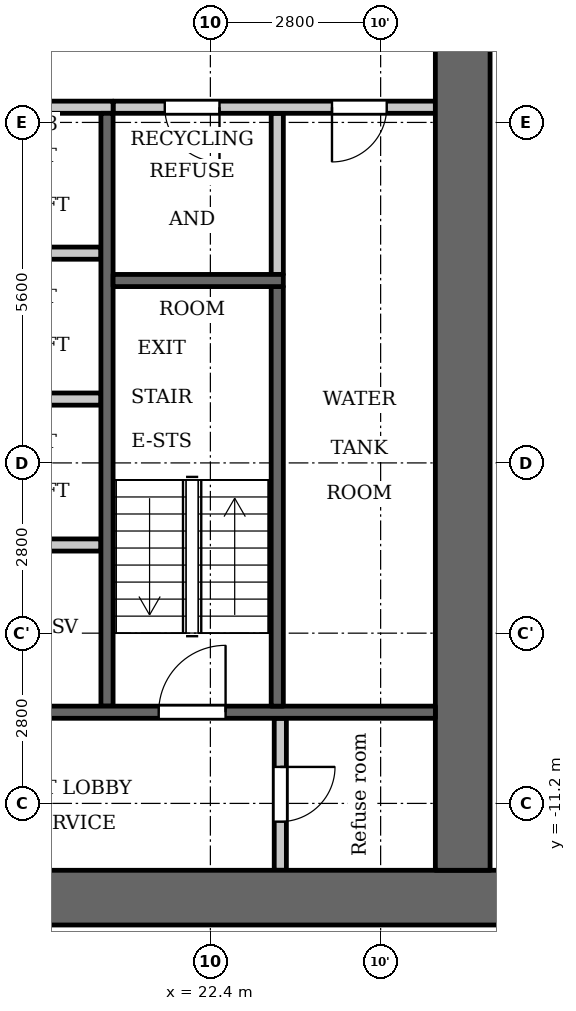
"""IFC4 building model, lengths in metres.
Left out: names, types, materials, properties, quantities, classifications, styles, units other than length and angle.
Written with IfcOpenShell. Run it as: python <this file> out.ifc"""

import sys

from ifc_helpers import new_model, si_unit, direction, frame, frame_2d, origin, place, context, subcontext, project, spatial, rectangle, extrude, element, fill, save


model = new_model("IFC4")
c1 = context("Model", 3, precision=1e-05, world=origin(), true_north=direction((0.0, 1.0)))
c2 = subcontext(c1, "Body", "Model", "MODEL_VIEW")
j1 = project(units=[si_unit("LENGTHUNIT", "METRE"), si_unit("PLANEANGLEUNIT", "RADIAN")], contexts=[c1])
p1 = place(None, origin())
s1 = spatial("IfcSite", under=j1, at=p1, CompositionType="ELEMENT")
p2 = place(p1, origin())
s2 = spatial("IfcBuilding", under=s1, at=p2, CompositionType="ELEMENT")
p3 = place(p2, frame((0.0, 0.0, 62.0)))
s3 = spatial("IfcBuildingStorey", under=s2, at=p3, CompositionType="ELEMENT", Elevation=62.0)
p4 = place(p3, frame((23.5, -2.5, 0.0), z_axis=(0.0, 0.0, 1.0), x_axis=(0.0, 1.0, 0.0)))
e1 = element("IfcWall", 1, at=p4, inside=s3, PredefinedType="PARTITIONING", context=c2, shape_type="SweptSolid", body=[
    extrude(rectangle(XDim=2.65, YDim=0.2, at=frame_2d((1.325, 0.0))), origin(), (0.0, 0.0, 1.0), 3.2),
])
p5 = place(p3, frame((20.7, -9.6, 0.0), z_axis=(0.0, 0.0, 1.0), x_axis=(0.0, 1.0, 0.0)))
e2 = element("IfcWall", 2, at=p5, inside=s3, PredefinedType="SHEAR", context=c2, shape_type="SweptSolid", body=[
    extrude(rectangle(XDim=9.75, YDim=0.2, at=frame_2d((4.875, 0.0))), origin(), (0.0, 0.0, 1.0), 3.2),
])
p6 = place(p3, frame((20.8, 0.25, 0.0), z_axis=(0.0, 0.0, 1.0), x_axis=(1.0, 0.0, 0.0)))
e3 = element("IfcWall", 3, at=p6, inside=s3, PredefinedType="PARTITIONING", context=c2, shape_type="SweptSolid", body=[
    extrude(rectangle(XDim=5.3, YDim=0.2, at=frame_2d((2.65, 0.0))), origin(), (0.0, 0.0, 1.0), 3.2),
])
p7 = place(p6, frame((0.85, 0.0, 0.0)))
e4 = element("IfcOpeningElement", 4, at=p7, cuts=e3, PredefinedType="OPENING", context=c2, shape_type="SweptSolid", body=[
    extrude(rectangle(XDim=0.9, YDim=2.1, at=frame_2d((0.45, 1.05))), frame((0.0, 0.11, 0.0), z_axis=(0.0, -1.0, 0.0), x_axis=(1.0, 0.0, 0.0)), (0.0, 0.0, 1.0), 0.22),
])
p8 = place(p6, frame((3.6, 0.0, 0.0)))
e5 = element("IfcOpeningElement", 5, at=p8, cuts=e3, PredefinedType="OPENING", context=c2, shape_type="SweptSolid", body=[
    extrude(rectangle(XDim=0.9, YDim=2.1, at=frame_2d((0.45, 1.05))), frame((0.0, 0.11, 0.0), z_axis=(0.0, -1.0, 0.0), x_axis=(1.0, 0.0, 0.0)), (0.0, 0.0, 1.0), 0.22),
])
p9 = place(p3, frame((17.4, -12.75, 0.0), z_axis=(0.0, 0.0, 1.0), x_axis=(1.0, 0.0, 0.0)))
e6 = element("IfcWall", 6, at=p9, inside=s3, PredefinedType="SHEAR", context=c2, shape_type="SweptSolid", body=[
    extrude(rectangle(XDim=10.4, YDim=0.9, at=frame_2d((5.2, 0.0))), origin(), (0.0, 0.0, 1.0), 3.2),
])
p10 = place(p3, frame((26.55, -12.3, 0.0), z_axis=(0.0, 0.0, 1.0), x_axis=(0.0, 1.0, 0.0)))
e7 = element("IfcWall", 7, at=p10, inside=s3, PredefinedType="SHEAR", context=c2, shape_type="SweptSolid", body=[
    extrude(rectangle(XDim=24.6, YDim=0.9, at=frame_2d((12.3, 0.0))), origin(), (0.0, 0.0, 1.0), 3.2),
])
p11 = place(p3, frame((23.55, -12.3, 0.0), z_axis=(0.0, 0.0, 1.0), x_axis=(0.0, 1.0, 0.0)))
e8 = element("IfcWall", 8, at=p11, inside=s3, PredefinedType="PARTITIONING", context=c2, shape_type="SweptSolid", body=[
    extrude(rectangle(XDim=2.5, YDim=0.2, at=frame_2d((1.25, 0.0))), origin(), (0.0, 0.0, 1.0), 3.2),
])
p12 = place(p11, frame((0.8, 0.0, 0.0)))
e9 = element("IfcOpeningElement", 9, at=p12, cuts=e8, PredefinedType="OPENING", context=c2, shape_type="SweptSolid", body=[
    extrude(rectangle(XDim=0.9, YDim=2.1, at=frame_2d((0.45, 1.05))), frame((0.0, 0.11, 0.0), z_axis=(0.0, -1.0, 0.0), x_axis=(1.0, 0.0, 0.0)), (0.0, 0.0, 1.0), 0.22),
])
p13 = place(p3, frame((17.8, -9.7, 0.0), z_axis=(0.0, 0.0, 1.0), x_axis=(1.0, 0.0, 0.0)))
e10 = element("IfcWall", 10, at=p13, inside=s3, PredefinedType="SHEAR", context=c2, shape_type="SweptSolid", body=[
    extrude(rectangle(XDim=8.3, YDim=0.2, at=frame_2d((4.15, 0.0))), origin(), (0.0, 0.0, 1.0), 3.2),
])
p14 = place(p13, frame((0.85, 0.0, 0.0)))
e11 = element("IfcOpeningElement", 11, at=p14, cuts=e10, PredefinedType="OPENING", context=c2, shape_type="SweptSolid", body=[
    extrude(rectangle(XDim=1.1, YDim=2.1, at=frame_2d((0.55, 1.05))), frame((0.0, 0.11, 0.0), z_axis=(0.0, -1.0, 0.0), x_axis=(1.0, 0.0, 0.0)), (0.0, 0.0, 1.0), 0.22),
])
p15 = place(p13, frame((3.75, 0.0, 0.0)))
e12 = element("IfcOpeningElement", 12, at=p15, cuts=e10, PredefinedType="OPENING", context=c2, shape_type="SweptSolid", body=[
    extrude(rectangle(XDim=1.1, YDim=2.1, at=frame_2d((0.55, 1.05))), frame((0.0, 0.11, 0.0), z_axis=(0.0, -1.0, 0.0), x_axis=(1.0, 0.0, 0.0)), (0.0, 0.0, 1.0), 0.22),
])
for number, where, z_axis, x_axis in (
    (13, (17.8, -6.95, 0.0), (0.0, 0.0, 1.0), (1.0, 0.0, 0.0)),
    (14, (17.8, -4.55, 0.0), (0.0, 0.0, 1.0), (1.0, 0.0, 0.0)),
    (15, (17.8, -2.15, 0.0), (0.0, 0.0, 1.0), (1.0, 0.0, 0.0)),
):
    element("IfcWall", number, at=place(p3, frame(where, z_axis=z_axis, x_axis=x_axis)), inside=s3, PredefinedType="PARTITIONING", context=c2, shape_type="SweptSolid", body=[
        extrude(rectangle(XDim=2.8, YDim=0.2, at=frame_2d((1.4, 0.0))), origin(), (0.0, 0.0, 1.0), 3.2),
    ])
p16 = place(p3, frame((17.8, 0.25, 0.0), z_axis=(0.0, 0.0, 1.0), x_axis=(1.0, 0.0, 0.0)))
e16 = element("IfcWall", 16, at=p16, inside=s3, PredefinedType="PARTITIONING", context=c2, shape_type="SweptSolid", body=[
    extrude(rectangle(XDim=3.0, YDim=0.2, at=frame_2d((1.5, 0.0))), origin(), (0.0, 0.0, 1.0), 3.2),
])
p17 = place(p3, frame((23.5, -9.6, 0.0), z_axis=(0.0, 0.0, 1.0), x_axis=(0.0, 1.0, 0.0)))
e17 = element("IfcWall", 17, at=p17, inside=s3, PredefinedType="SHEAR", context=c2, shape_type="SweptSolid", body=[
    extrude(rectangle(XDim=6.9, YDim=0.2, at=frame_2d((3.45, 0.0))), origin(), (0.0, 0.0, 1.0), 3.2),
])
p18 = place(p3, frame((20.8, -2.6, 0.0), z_axis=(0.0, 0.0, 1.0), x_axis=(1.0, 0.0, 0.0)))
e18 = element("IfcWall", 18, at=p18, inside=s3, PredefinedType="SHEAR", context=c2, shape_type="SweptSolid", body=[
    extrude(rectangle(XDim=2.8, YDim=0.2, at=frame_2d((1.4, 0.0))), origin(), (0.0, 0.0, 1.0), 3.2),
])
p19 = place(p12, origin())
e19 = element("IfcDoor", 19, at=p19, inside=s3, OperationType="SINGLE_SWING_RIGHT", PredefinedType="DOOR", context=c2, shape_type="SweptSolid", body=[
    extrude(rectangle(XDim=0.9, YDim=2.1, at=frame_2d((0.45, 1.05))), frame((0.0, 0.025, 0.0), z_axis=(0.0, -1.0, 0.0), x_axis=(1.0, 0.0, 0.0)), (0.0, 0.0, 1.0), 0.05),
])
fill(e9, e19)
p20 = place(p15, origin())
e20 = element("IfcDoor", 20, at=p20, inside=s3, OperationType="SINGLE_SWING_LEFT", PredefinedType="DOOR", context=c2, shape_type="SweptSolid", body=[
    extrude(rectangle(XDim=1.1, YDim=2.1, at=frame_2d((0.55, 1.05))), frame((0.0, 0.025, 0.0), z_axis=(0.0, -1.0, 0.0), x_axis=(1.0, 0.0, 0.0)), (0.0, 0.0, 1.0), 0.05),
])
fill(e12, e20)
p21 = place(p7, origin())
e21 = element("IfcDoor", 21, at=p21, inside=s3, OperationType="SINGLE_SWING_RIGHT", PredefinedType="DOOR", context=c2, shape_type="SweptSolid", body=[
    extrude(rectangle(XDim=0.9, YDim=2.1, at=frame_2d((0.45, 1.05))), frame((0.0, 0.025, 0.0), z_axis=(0.0, -1.0, 0.0), x_axis=(1.0, 0.0, 0.0)), (0.0, 0.0, 1.0), 0.05),
])
fill(e4, e21)
p22 = place(p8, origin())
e22 = element("IfcDoor", 22, at=p22, inside=s3, OperationType="SINGLE_SWING_LEFT", PredefinedType="DOOR", context=c2, shape_type="SweptSolid", body=[
    extrude(rectangle(XDim=0.9, YDim=2.1, at=frame_2d((0.45, 1.05))), frame((0.0, 0.025, 0.0), z_axis=(0.0, -1.0, 0.0), x_axis=(1.0, 0.0, 0.0)), (0.0, 0.0, 1.0), 0.05),
])
fill(e5, e22)
save(model, sys.argv[1])
